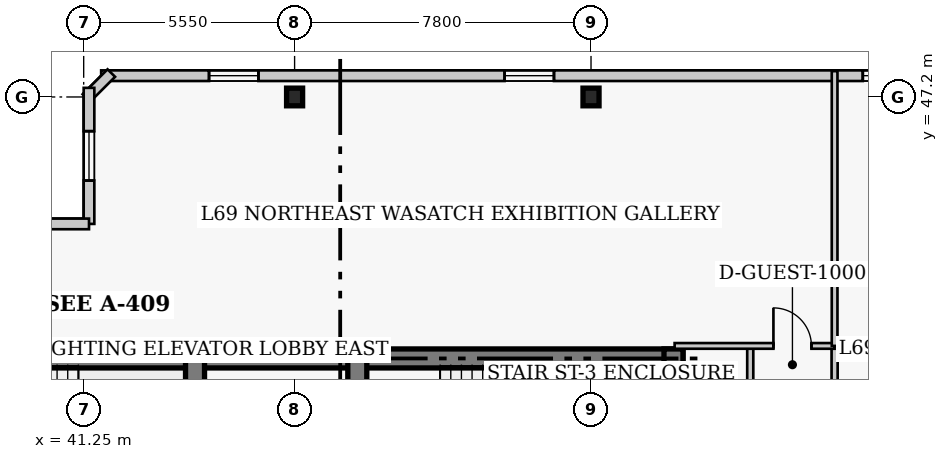
"""IFC4 building model, lengths in metres.
Left out: names, types, materials, properties, quantities, classifications, styles, units other than length and angle.
Written with IfcOpenShell. Run it as: python <this file> out.ifc"""

import sys

from ifc_helpers import new_model, si_unit, direction, frame, frame_2d, origin, origin_2d, place, context, subcontext, project, spatial, rectangle, i_section, extrude, element, fill, save


model = new_model("IFC4")
c1 = context("Model", 3, precision=1e-05, world=origin(), true_north=direction((0.0, 1.0)))
c2 = subcontext(c1, "Body", "Model", "MODEL_VIEW")
j1 = project(units=[si_unit("LENGTHUNIT", "METRE"), si_unit("PLANEANGLEUNIT", "RADIAN")], contexts=[c1])
p1 = place(None, origin())
s1 = spatial("IfcSite", under=j1, at=p1, CompositionType="ELEMENT")
p2 = place(p1, origin())
s2 = spatial("IfcBuilding", under=s1, at=p2, CompositionType="ELEMENT")
p3 = place(p2, frame((0.0, 0.0, 277.4)))
s3 = spatial("IfcBuildingStorey", under=s2, at=p3, CompositionType="ELEMENT", Elevation=277.4)
p4 = place(p3, frame((35.85, 40.32, 0.0), z_axis=(0.0, 0.0, 1.0), x_axis=(1.0, 0.0, 0.0)))
e1 = element("IfcWall", 1, at=p4, inside=s3, PredefinedType="SHEAR", context=c2, shape_type="SweptSolid", body=[
    extrude(rectangle(XDim=12.6, YDim=0.5, at=frame_2d((6.3, 0.0))), origin(), (0.0, 0.0, 1.0), 4.0),
])
p5 = place(p3, frame((48.45, 40.32, 0.0), z_axis=(0.0, 0.0, 1.0), x_axis=(1.0, 0.0, 0.0)))
e2 = element("IfcWall", 2, at=p5, inside=s3, PredefinedType="SHEAR", context=c2, shape_type="SweptSolid", body=[
    extrude(rectangle(XDim=8.57, YDim=0.5, at=frame_2d((4.285, 0.0))), origin(), (0.0, 0.0, 1.0), 4.0),
])
p6 = place(p3, frame((56.77, 27.05, 0.0), z_axis=(0.0, 0.0, 1.0), x_axis=(0.0, 1.0, 0.0)))
e3 = element("IfcWall", 3, at=p6, inside=s3, PredefinedType="SHEAR", context=c2, shape_type="SweptSolid", body=[
    extrude(rectangle(XDim=13.52, YDim=0.5, at=frame_2d((6.76, 0.0))), origin(), (0.0, 0.0, 1.0), 4.0),
])
p7 = place(p3, frame((44.18, 36.37, 0.0), z_axis=(0.0, 0.0, 1.0), x_axis=(0.0, 1.0, 0.0)))
e4 = element("IfcWall", 4, at=p7, inside=s3, PredefinedType="SHEAR", context=c2, shape_type="SweptSolid", body=[
    extrude(rectangle(XDim=3.95, YDim=0.5, at=frame_2d((1.975, 0.0))), origin(), (0.0, 0.0, 1.0), 4.0),
])
p8 = place(p3, frame((48.45, 32.5, 0.0), z_axis=(0.0, 0.0, 1.0), x_axis=(0.0, 1.0, 0.0)))
e5 = element("IfcWall", 5, at=p8, inside=s3, PredefinedType="SHEAR", context=c2, shape_type="SweptSolid", body=[
    extrude(rectangle(XDim=7.82, YDim=0.5, at=frame_2d((3.91, 0.0))), origin(), (0.0, 0.0, 1.0), 4.0),
])
p9 = place(p8, frame((5.7, 0.0, 0.0)))
e6 = element("IfcOpeningElement", 6, at=p9, cuts=e5, PredefinedType="OPENING", context=c2, shape_type="SweptSolid", body=[
    extrude(rectangle(XDim=1.1, YDim=2.15, at=frame_2d((0.55, 1.075))), frame((0.0, 0.26, 0.0), z_axis=(0.0, -1.0, 0.0), x_axis=(1.0, 0.0, 0.0)), (0.0, 0.0, 1.0), 0.52),
])
for number, where, z_axis, x_axis in (
    (7, (46.8, 47.2, 0.0), (0.0, 0.0, 1.0), (1.0, 0.0, 0.0)),
    (8, (54.6, 47.2, 0.0), (0.0, 0.0, 1.0), (1.0, 0.0, 0.0)),
):
    element("IfcColumn", number, at=place(p3, frame(where, z_axis=z_axis, x_axis=x_axis)), inside=s3, PredefinedType="COLUMN", context=c2, shape_type="SweptSolid", body=[
        extrude(i_section(OverallWidth=0.422, OverallDepth=0.465, WebThickness=0.045, FlangeThickness=0.073, FilletRadius=0.017, at=origin_2d()), origin(), (0.0, 0.0, 1.0), 4.0),
    ])
p10 = place(p3, frame((66.54, 47.76, 0.0), z_axis=(0.0, 0.0, 1.0), x_axis=(-1.0, 0.0, 0.0)))
e9 = element("IfcWall", 9, at=p10, inside=s3, PredefinedType="SOLIDWALL", context=c2, shape_type="SweptSolid", body=[
    extrude(rectangle(XDim=24.83, YDim=0.28, at=frame_2d((12.415, 0.0))), origin(), (0.0, 0.0, 1.0), 3.76),
])
p11 = place(p10, frame((3.488, 0.0, 0.85)))
e10 = element("IfcOpeningElement", 10, at=p11, cuts=e9, PredefinedType="OPENING", context=c2, shape_type="SweptSolid", body=[
    extrude(rectangle(XDim=1.3, YDim=1.7, at=frame_2d((0.65, 0.85))), frame((0.0, 0.15, 0.0), z_axis=(0.0, -1.0, 0.0), x_axis=(1.0, 0.0, 0.0)), (0.0, 0.0, 1.0), 0.3),
])
p12 = place(p10, frame((12.915, 0.0, 0.85)))
e11 = element("IfcOpeningElement", 11, at=p12, cuts=e9, PredefinedType="OPENING", context=c2, shape_type="SweptSolid", body=[
    extrude(rectangle(XDim=1.3, YDim=1.7, at=frame_2d((0.65, 0.85))), frame((0.0, 0.15, 0.0), z_axis=(0.0, -1.0, 0.0), x_axis=(1.0, 0.0, 0.0)), (0.0, 0.0, 1.0), 0.3),
])
p13 = place(p10, frame((20.692, 0.0, 0.85)))
e12 = element("IfcOpeningElement", 12, at=p13, cuts=e9, PredefinedType="OPENING", context=c2, shape_type="SweptSolid", body=[
    extrude(rectangle(XDim=1.3, YDim=1.7, at=frame_2d((0.65, 0.85))), frame((0.0, 0.15, 0.0), z_axis=(0.0, -1.0, 0.0), x_axis=(1.0, 0.0, 0.0)), (0.0, 0.0, 1.0), 0.3),
])
p14 = place(p3, frame((41.977, 47.829, 0.0), z_axis=(0.0, 0.0, 1.0), x_axis=(-0.706975312048, -0.707238225886, 0.0)))
e13 = element("IfcWall", 13, at=p14, inside=s3, PredefinedType="SOLIDWALL", context=c2, shape_type="SweptSolid", body=[
    extrude(rectangle(XDim=0.929, YDim=0.28, at=frame_2d((0.464, 0.0))), origin(), (0.0, 0.0, 1.0), 3.76),
])
p15 = place(p3, frame((41.39, 47.44, 0.0), z_axis=(0.0, 0.0, 1.0), x_axis=(0.0, -1.0, 0.0)))
e14 = element("IfcWall", 14, at=p15, inside=s3, PredefinedType="SOLIDWALL", context=c2, shape_type="SweptSolid", body=[
    extrude(rectangle(XDim=3.58, YDim=0.28, at=frame_2d((1.79, 0.0))), origin(), (0.0, 0.0, 1.0), 3.76),
])
p16 = place(p15, frame((1.14, 0.0, 0.85)))
e15 = element("IfcOpeningElement", 15, at=p16, cuts=e14, PredefinedType="OPENING", context=c2, shape_type="SweptSolid", body=[
    extrude(rectangle(XDim=1.3, YDim=1.7, at=frame_2d((0.65, 0.85))), frame((0.0, 0.15, 0.0), z_axis=(0.0, -1.0, 0.0), x_axis=(1.0, 0.0, 0.0)), (0.0, 0.0, 1.0), 0.3),
])
p17 = place(p3, frame((41.39, 43.86, 0.0), z_axis=(0.0, 0.0, 1.0), x_axis=(-1.0, 0.0, 0.0)))
e16 = element("IfcWall", 16, at=p17, inside=s3, PredefinedType="SOLIDWALL", context=c2, shape_type="SweptSolid", body=[
    extrude(rectangle(XDim=4.78, YDim=0.28, at=frame_2d((2.39, 0.0))), origin(), (0.0, 0.0, 1.0), 3.76),
])
p18 = place(p17, frame((1.74, 0.0, 0.85)))
e17 = element("IfcOpeningElement", 17, at=p18, cuts=e16, PredefinedType="OPENING", context=c2, shape_type="SweptSolid", body=[
    extrude(rectangle(XDim=1.3, YDim=1.7, at=frame_2d((0.65, 0.85))), frame((0.0, 0.15, 0.0), z_axis=(0.0, -1.0, 0.0), x_axis=(1.0, 0.0, 0.0)), (0.0, 0.0, 1.0), 0.3),
])
p19 = place(p3, frame((61.01, 22.55, 0.0), z_axis=(0.0, 0.0, 1.0), x_axis=(0.0, 1.0, 0.0)))
e18 = element("IfcWall", 18, at=p19, inside=s3, PredefinedType="PARTITIONING", context=c2, shape_type="SweptSolid", body=[
    extrude(rectangle(XDim=18.1, YDim=0.16, at=frame_2d((9.05, 0.0))), origin(), (0.0, 0.0, 1.0), 3.76),
])
p20 = place(p19, frame((2.65, 0.0, 0.0)))
e19 = element("IfcOpeningElement", 19, at=p20, cuts=e18, PredefinedType="OPENING", context=c2, shape_type="SweptSolid", body=[
    extrude(rectangle(XDim=0.95, YDim=2.1, at=frame_2d((0.475, 1.05))), frame((0.0, 0.09, 0.0), z_axis=(0.0, -1.0, 0.0), x_axis=(1.0, 0.0, 0.0)), (0.0, 0.0, 1.0), 0.18),
])
p21 = place(p19, frame((9.175, 0.0, 0.0)))
e20 = element("IfcOpeningElement", 20, at=p21, cuts=e18, PredefinedType="OPENING", context=c2, shape_type="SweptSolid", body=[
    extrude(rectangle(XDim=0.95, YDim=2.1, at=frame_2d((0.475, 1.05))), frame((0.0, 0.09, 0.0), z_axis=(0.0, -1.0, 0.0), x_axis=(1.0, 0.0, 0.0)), (0.0, 0.0, 1.0), 0.18),
])
p22 = place(p19, frame((13.6, 0.0, 0.0)))
e21 = element("IfcOpeningElement", 21, at=p22, cuts=e18, PredefinedType="OPENING", context=c2, shape_type="SweptSolid", body=[
    extrude(rectangle(XDim=1.0, YDim=2.15, at=frame_2d((0.5, 1.075))), frame((0.0, 0.09, 0.0), z_axis=(0.0, -1.0, 0.0), x_axis=(1.0, 0.0, 0.0)), (0.0, 0.0, 1.0), 0.18),
])
p23 = place(p3, frame((58.79, 24.71, 0.0), z_axis=(0.0, 0.0, 1.0), x_axis=(0.0, 1.0, 0.0)))
e22 = element("IfcWall", 22, at=p23, inside=s3, PredefinedType="PARTITIONING", context=c2, shape_type="SweptSolid", body=[
    extrude(rectangle(XDim=15.94, YDim=0.16, at=frame_2d((7.97, 0.0))), origin(), (0.0, 0.0, 1.0), 3.76),
])
p24 = place(p3, frame((56.8, 40.65, 0.0), z_axis=(0.0, 0.0, 1.0), x_axis=(1.0, 0.0, 0.0)))
e23 = element("IfcWall", 23, at=p24, inside=s3, PredefinedType="PARTITIONING", context=c2, shape_type="SweptSolid", body=[
    extrude(rectangle(XDim=4.21, YDim=0.15, at=frame_2d((2.105, 0.0))), origin(), (0.0, 0.0, 1.0), 3.76),
])
p25 = place(p24, frame((2.6, 0.0, 0.0)))
e24 = element("IfcOpeningElement", 24, at=p25, cuts=e23, PredefinedType="OPENING", context=c2, shape_type="SweptSolid", body=[
    extrude(rectangle(XDim=1.0, YDim=2.15, at=frame_2d((0.5, 1.075))), frame((0.0, 0.085, 0.0), z_axis=(0.0, -1.0, 0.0), x_axis=(1.0, 0.0, 0.0)), (0.0, 0.0, 1.0), 0.17),
])
p26 = place(p3, frame((61.01, 40.65, 0.0), z_axis=(0.0, 0.0, 1.0), x_axis=(0.0, 1.0, 0.0)))
e25 = element("IfcWall", 25, at=p26, inside=s3, PredefinedType="PARTITIONING", context=c2, shape_type="SweptSolid", body=[
    extrude(rectangle(XDim=7.23, YDim=0.15, at=frame_2d((3.615, 0.0))), origin(), (0.0, 0.0, 1.0), 3.76),
])
p27 = place(p11, origin())
e26 = element("IfcWindow", 26, at=p27, inside=s3, PartitioningType="SINGLE_PANEL", PredefinedType="WINDOW", context=c2, shape_type="SweptSolid", body=[
    extrude(rectangle(XDim=1.3, YDim=1.7, at=frame_2d((0.65, 0.85))), frame((0.0, 0.03, 0.0), z_axis=(0.0, -1.0, 0.0), x_axis=(1.0, 0.0, 0.0)), (0.0, 0.0, 1.0), 0.06),
])
fill(e10, e26)
p28 = place(p12, origin())
e27 = element("IfcWindow", 27, at=p28, inside=s3, PartitioningType="SINGLE_PANEL", PredefinedType="WINDOW", context=c2, shape_type="SweptSolid", body=[
    extrude(rectangle(XDim=1.3, YDim=1.7, at=frame_2d((0.65, 0.85))), frame((0.0, 0.03, 0.0), z_axis=(0.0, -1.0, 0.0), x_axis=(1.0, 0.0, 0.0)), (0.0, 0.0, 1.0), 0.06),
])
fill(e11, e27)
p29 = place(p13, origin())
e28 = element("IfcWindow", 28, at=p29, inside=s3, PartitioningType="SINGLE_PANEL", PredefinedType="WINDOW", context=c2, shape_type="SweptSolid", body=[
    extrude(rectangle(XDim=1.3, YDim=1.7, at=frame_2d((0.65, 0.85))), frame((0.0, 0.03, 0.0), z_axis=(0.0, -1.0, 0.0), x_axis=(1.0, 0.0, 0.0)), (0.0, 0.0, 1.0), 0.06),
])
fill(e12, e28)
p30 = place(p16, origin())
e29 = element("IfcWindow", 29, at=p30, inside=s3, PartitioningType="SINGLE_PANEL", PredefinedType="WINDOW", context=c2, shape_type="SweptSolid", body=[
    extrude(rectangle(XDim=1.3, YDim=1.7, at=frame_2d((0.65, 0.85))), frame((0.0, 0.03, 0.0), z_axis=(0.0, -1.0, 0.0), x_axis=(1.0, 0.0, 0.0)), (0.0, 0.0, 1.0), 0.06),
])
fill(e15, e29)
p31 = place(p25, origin())
e30 = element("IfcDoor", 30, at=p31, inside=s3, OperationType="SINGLE_SWING_LEFT", PredefinedType="DOOR", context=c2, shape_type="SweptSolid", body=[
    extrude(rectangle(XDim=1.0, YDim=2.15, at=frame_2d((0.5, 1.075))), frame((0.0, 0.025, 0.0), z_axis=(0.0, -1.0, 0.0), x_axis=(1.0, 0.0, 0.0)), (0.0, 0.0, 1.0), 0.05),
])
fill(e24, e30)
save(model, sys.argv[1])
